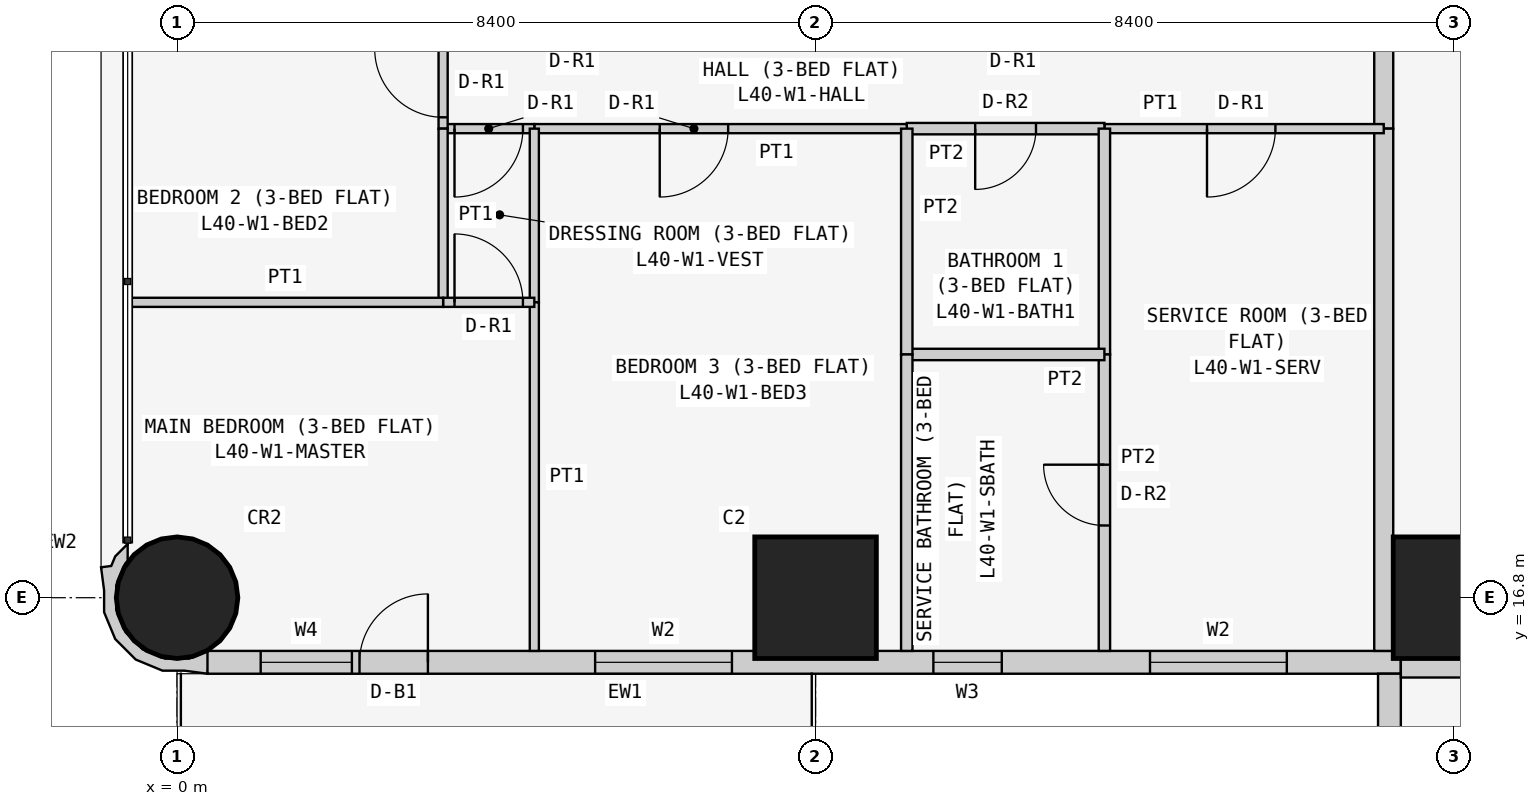
"""IFC4 building model, lengths in metres.
Left out: names, types, materials, properties, quantities, classifications, styles, units other than length and angle.
Written with IfcOpenShell. Run it as: python <this file> out.ifc"""

import sys

from ifc_helpers import new_model, si_unit, direction, frame, frame_2d, origin, origin_2d, place, context, subcontext, project, spatial, polyline, rectangle, circle, outline, extrude, element, fill, save


model = new_model("IFC4")
c1 = context("Model", 3, precision=1e-05, world=origin(), true_north=direction((0.0, 1.0)))
c2 = subcontext(c1, "Body", "Model", "MODEL_VIEW")
j1 = project(units=[si_unit("LENGTHUNIT", "METRE"), si_unit("PLANEANGLEUNIT", "RADIAN")], contexts=[c1])
p1 = place(None, origin())
s1 = spatial("IfcSite", under=j1, at=p1, CompositionType="ELEMENT")
p2 = place(p1, origin())
s2 = spatial("IfcBuilding", under=s1, at=p2, CompositionType="ELEMENT")
p3 = place(p2, frame((0.0, 0.0, 155.7)))
s3 = spatial("IfcBuildingStorey", under=s2, at=p3, CompositionType="ELEMENT", Elevation=155.7)
p4 = place(p3, frame((0.0, 16.8, 0.0), z_axis=(0.0, 0.0, 1.0), x_axis=(1.0, 0.0, 0.0)))
e1 = element("IfcColumn", 1, at=p4, inside=s3, PredefinedType="COLUMN", context=c2, shape_type="SweptSolid", body=[
    extrude(circle(Radius=0.8, at=origin_2d()), origin(), (0.0, 0.0, 1.0), 3.6),
])
for number, where, z_axis, x_axis in (
    (2, (8.4, 16.8, 0.0), (0.0, 0.0, 1.0), (1.0, 0.0, 0.0)),
    (3, (16.8, 16.8, 0.0), (0.0, 0.0, 1.0), (1.0, 0.0, 0.0)),
):
    element("IfcColumn", number, at=place(p3, frame(where, z_axis=z_axis, x_axis=x_axis)), inside=s3, PredefinedType="COLUMN", context=c2, shape_type="SweptSolid", body=[
        extrude(rectangle(XDim=1.6, YDim=1.6, at=origin_2d()), origin(), (0.0, 0.0, 1.0), 3.6),
    ])
p5 = place(p3, frame((0.4, 15.95, 0.0), z_axis=(0.0, 0.0, 1.0), x_axis=(1.0, 0.0, 0.0)))
e4 = element("IfcWall", 4, at=p5, inside=s3, PredefinedType="SOLIDWALL", context=c2, shape_type="SweptSolid", body=[
    extrude(rectangle(XDim=15.7, YDim=0.3, at=frame_2d((7.85, 0.0))), origin(), (0.0, 0.0, 1.0), 3.45),
])
p6 = place(p5, frame((12.4, 0.0, 0.9)))
e5 = element("IfcOpeningElement", 5, at=p6, cuts=e4, PredefinedType="OPENING", context=c2, shape_type="SweptSolid", body=[
    extrude(rectangle(XDim=1.8, YDim=1.5, at=frame_2d((0.9, 0.75))), frame((0.0, 0.16, 0.0), z_axis=(0.0, -1.0, 0.0), x_axis=(1.0, 0.0, 0.0)), (0.0, 0.0, 1.0), 0.32),
])
p7 = place(p5, frame((9.55, 0.0, 1.5)))
e6 = element("IfcOpeningElement", 6, at=p7, cuts=e4, PredefinedType="OPENING", context=c2, shape_type="SweptSolid", body=[
    extrude(rectangle(XDim=0.9, YDim=0.7, at=frame_2d((0.45, 0.35))), frame((0.0, 0.16, 0.0), z_axis=(0.0, -1.0, 0.0), x_axis=(1.0, 0.0, 0.0)), (0.0, 0.0, 1.0), 0.32),
])
p8 = place(p5, frame((5.1, 0.0, 0.9)))
e7 = element("IfcOpeningElement", 7, at=p8, cuts=e4, PredefinedType="OPENING", context=c2, shape_type="SweptSolid", body=[
    extrude(rectangle(XDim=1.8, YDim=1.5, at=frame_2d((0.9, 0.75))), frame((0.0, 0.16, 0.0), z_axis=(0.0, -1.0, 0.0), x_axis=(1.0, 0.0, 0.0)), (0.0, 0.0, 1.0), 0.32),
])
p9 = place(p5, frame((2.0, 0.0, 0.0)))
e8 = element("IfcOpeningElement", 8, at=p9, cuts=e4, PredefinedType="OPENING", context=c2, shape_type="SweptSolid", body=[
    extrude(rectangle(XDim=0.9, YDim=2.4, at=frame_2d((0.45, 1.2))), frame((0.0, 0.16, 0.0), z_axis=(0.0, -1.0, 0.0), x_axis=(1.0, 0.0, 0.0)), (0.0, 0.0, 1.0), 0.32),
])
p10 = place(p5, frame((0.7, 0.0, 0.9)))
e9 = element("IfcOpeningElement", 9, at=p10, cuts=e4, PredefinedType="OPENING", context=c2, shape_type="SweptSolid", body=[
    extrude(rectangle(XDim=1.2, YDim=1.5, at=frame_2d((0.6, 0.75))), frame((0.0, 0.16, 0.0), z_axis=(0.0, -1.0, 0.0), x_axis=(1.0, 0.0, 0.0)), (0.0, 0.0, 1.0), 0.32),
])
p11 = place(p3, frame((15.95, 15.8, 0.0), z_axis=(0.0, 0.0, 1.0), x_axis=(0.0, -1.0, 0.0)))
e10 = element("IfcWall", 10, at=p11, inside=s3, PredefinedType="SOLIDWALL", context=c2, shape_type="SweptSolid", body=[
    extrude(rectangle(XDim=7.0, YDim=0.3, at=frame_2d((3.5, 0.0))), origin(), (0.0, 0.0, 1.0), 3.45),
])
p12 = place(p11, frame((1.5, 0.0, 0.9)))
e11 = element("IfcOpeningElement", 11, at=p12, cuts=e10, PredefinedType="OPENING", context=c2, shape_type="SweptSolid", body=[
    extrude(rectangle(XDim=2.4, YDim=1.5, at=frame_2d((1.2, 0.75))), frame((0.0, 0.16, 0.0), z_axis=(0.0, -1.0, 0.0), x_axis=(1.0, 0.0, 0.0)), (0.0, 0.0, 1.0), 0.32),
])
p13 = place(p11, frame((5.05, 0.0, 0.9)))
e12 = element("IfcOpeningElement", 12, at=p13, cuts=e10, PredefinedType="OPENING", context=c2, shape_type="SweptSolid", body=[
    extrude(rectangle(XDim=1.2, YDim=1.5, at=frame_2d((0.6, 0.75))), frame((0.0, 0.16, 0.0), z_axis=(0.0, -1.0, 0.0), x_axis=(1.0, 0.0, 0.0)), (0.0, 0.0, 1.0), 0.32),
])
p14 = place(p3, frame((-0.595, 17.448, 0.0), z_axis=(0.0, 0.0, 1.0), x_axis=(-0.93923434088, -0.343276641956, 0.0)))
e13 = element("IfcWall", 13, at=p14, inside=s3, PredefinedType="SOLIDWALL", context=c2, shape_type="SweptSolid", body=[
    extrude(outline(polyline([(-0.369, 1.89), (-0.509, 1.621), (-0.491, 1.614), (-0.479, 1.609), (-0.211, 1.62), (0.088, 1.511), (0.323, 1.295), (0.457, 1.006), (0.47, 0.688), (0.361, 0.389), (0.146, 0.154), (0.108, 0.137), (0.031, -0.075), (0.241, 0.023), (0.334, 0.124), (0.465, 0.094), (0.532, 0.393), (0.631, 0.663), (0.614, 1.045), (0.453, 1.391), (0.172, 1.649), (-0.098, 1.748), (-0.369, 1.89)])), origin(), (0.0, 0.0, 1.0), 3.45),
])
p15 = place(p3, frame((22.571, 15.875, 0.0), z_axis=(0.0, 0.0, 1.0), x_axis=(-1.0, 0.0, 0.0)))
e14 = element("IfcWall", 14, at=p15, inside=s3, PredefinedType="PARTITIONING", context=c2, shape_type="SweptSolid", body=[
    extrude(rectangle(XDim=6.471, YDim=0.25, at=frame_2d((3.235, 0.0))), origin(), (0.0, 0.0, 1.0), 3.45),
])
p16 = place(p3, frame((15.875, 22.971, 0.0), z_axis=(0.0, 0.0, 1.0), x_axis=(0.0, 1.0, 0.0)))
e15 = element("IfcWall", 15, at=p16, inside=s3, PredefinedType="PARTITIONING", context=c2, shape_type="SweptSolid", body=[
    extrude(rectangle(XDim=1.2, YDim=0.25, at=frame_2d((0.6, 0.0))), origin(), (0.0, 0.0, 1.0), 3.45),
])
p17 = place(p3, frame((15.875, 16.1, 0.0), z_axis=(0.0, 0.0, 1.0), x_axis=(0.0, 1.0, 0.0)))
e16 = element("IfcWall", 16, at=p17, inside=s3, PredefinedType="PARTITIONING", context=c2, shape_type="SweptSolid", body=[
    extrude(rectangle(XDim=6.871, YDim=0.25, at=frame_2d((3.436, 0.0))), origin(), (0.0, 0.0, 1.0), 3.45),
])
p18 = place(p3, frame((12.2, 22.971, 0.0), z_axis=(0.0, 0.0, 1.0), x_axis=(1.0, 0.0, 0.0)))
e17 = element("IfcWall", 17, at=p18, inside=s3, PredefinedType="PARTITIONING", context=c2, shape_type="SweptSolid", body=[
    extrude(rectangle(XDim=3.675, YDim=0.12, at=frame_2d((1.837, 0.0))), origin(), (0.0, 0.0, 1.0), 3.45),
])
p19 = place(p18, frame((1.35, 0.0, 0.0)))
e18 = element("IfcOpeningElement", 18, at=p19, cuts=e17, PredefinedType="OPENING", context=c2, shape_type="SweptSolid", body=[
    extrude(rectangle(XDim=0.9, YDim=2.1, at=frame_2d((0.45, 1.05))), frame((0.0, 0.07, 0.0), z_axis=(0.0, -1.0, 0.0), x_axis=(1.0, 0.0, 0.0)), (0.0, 0.0, 1.0), 0.14),
])
p20 = place(p3, frame((9.6, 22.971, 0.0), z_axis=(0.0, 0.0, 1.0), x_axis=(1.0, 0.0, 0.0)))
e19 = element("IfcWall", 19, at=p20, inside=s3, PredefinedType="PARTITIONING", context=c2, shape_type="SweptSolid", body=[
    extrude(rectangle(XDim=2.6, YDim=0.15, at=frame_2d((1.3, 0.0))), origin(), (0.0, 0.0, 1.0), 3.45),
])
p21 = place(p20, frame((0.9, 0.0, 0.0)))
e20 = element("IfcOpeningElement", 20, at=p21, cuts=e19, PredefinedType="OPENING", context=c2, shape_type="SweptSolid", body=[
    extrude(rectangle(XDim=0.8, YDim=2.1, at=frame_2d((0.4, 1.05))), frame((0.0, 0.085, 0.0), z_axis=(0.0, -1.0, 0.0), x_axis=(1.0, 0.0, 0.0)), (0.0, 0.0, 1.0), 0.17),
])
p22 = place(p3, frame((4.7, 22.971, 0.0), z_axis=(0.0, 0.0, 1.0), x_axis=(1.0, 0.0, 0.0)))
e21 = element("IfcWall", 21, at=p22, inside=s3, PredefinedType="PARTITIONING", context=c2, shape_type="SweptSolid", body=[
    extrude(rectangle(XDim=4.9, YDim=0.12, at=frame_2d((2.45, 0.0))), origin(), (0.0, 0.0, 1.0), 3.45),
])
p23 = place(p22, frame((1.65, 0.0, 0.0)))
e22 = element("IfcOpeningElement", 22, at=p23, cuts=e21, PredefinedType="OPENING", context=c2, shape_type="SweptSolid", body=[
    extrude(rectangle(XDim=0.9, YDim=2.1, at=frame_2d((0.45, 1.05))), frame((0.0, 0.07, 0.0), z_axis=(0.0, -1.0, 0.0), x_axis=(1.0, 0.0, 0.0)), (0.0, 0.0, 1.0), 0.14),
])
p24 = place(p3, frame((3.5, 22.971, 0.0), z_axis=(0.0, 0.0, 1.0), x_axis=(1.0, 0.0, 0.0)))
e23 = element("IfcWall", 23, at=p24, inside=s3, PredefinedType="PARTITIONING", context=c2, shape_type="SweptSolid", body=[
    extrude(rectangle(XDim=1.2, YDim=0.12, at=frame_2d((0.6, 0.0))), origin(), (0.0, 0.0, 1.0), 3.45),
])
p25 = place(p24, frame((0.15, 0.0, 0.0)))
e24 = element("IfcOpeningElement", 24, at=p25, cuts=e23, PredefinedType="OPENING", context=c2, shape_type="SweptSolid", body=[
    extrude(rectangle(XDim=0.9, YDim=2.1, at=frame_2d((0.45, 1.05))), frame((0.0, 0.07, 0.0), z_axis=(0.0, -1.0, 0.0), x_axis=(1.0, 0.0, 0.0)), (0.0, 0.0, 1.0), 0.14),
])
p26 = place(p3, frame((3.5, 24.171, 0.0), z_axis=(0.0, 0.0, 1.0), x_axis=(0.0, -1.0, 0.0)))
e25 = element("IfcWall", 25, at=p26, inside=s3, PredefinedType="PARTITIONING", context=c2, shape_type="SweptSolid", body=[
    extrude(rectangle(XDim=1.2, YDim=0.12, at=frame_2d((0.6, 0.0))), origin(), (0.0, 0.0, 1.0), 3.45),
])
p27 = place(p26, frame((0.151, 0.0, 0.0)))
e26 = element("IfcOpeningElement", 26, at=p27, cuts=e25, PredefinedType="OPENING", context=c2, shape_type="SweptSolid", body=[
    extrude(rectangle(XDim=0.9, YDim=2.1, at=frame_2d((0.45, 1.05))), frame((0.0, 0.07, 0.0), z_axis=(0.0, -1.0, 0.0), x_axis=(1.0, 0.0, 0.0)), (0.0, 0.0, 1.0), 0.14),
])
p28 = place(p3, frame((12.2, 22.971, 0.0), z_axis=(0.0, 0.0, 1.0), x_axis=(0.0, -1.0, 0.0)))
e27 = element("IfcWall", 27, at=p28, inside=s3, PredefinedType="PARTITIONING", context=c2, shape_type="SweptSolid", body=[
    extrude(rectangle(XDim=2.971, YDim=0.15, at=frame_2d((1.485, 0.0))), origin(), (0.0, 0.0, 1.0), 3.45),
])
p29 = place(p3, frame((12.2, 20.0, 0.0), z_axis=(0.0, 0.0, 1.0), x_axis=(0.0, -1.0, 0.0)))
e28 = element("IfcWall", 28, at=p29, inside=s3, PredefinedType="PARTITIONING", context=c2, shape_type="SweptSolid", body=[
    extrude(rectangle(XDim=3.9, YDim=0.15, at=frame_2d((1.95, 0.0))), origin(), (0.0, 0.0, 1.0), 3.45),
])
p30 = place(p29, frame((1.45, 0.0, 0.0)))
e29 = element("IfcOpeningElement", 29, at=p30, cuts=e28, PredefinedType="OPENING", context=c2, shape_type="SweptSolid", body=[
    extrude(rectangle(XDim=0.8, YDim=2.1, at=frame_2d((0.4, 1.05))), frame((0.0, 0.085, 0.0), z_axis=(0.0, -1.0, 0.0), x_axis=(1.0, 0.0, 0.0)), (0.0, 0.0, 1.0), 0.17),
])
p31 = place(p3, frame((9.6, 20.0, 0.0), z_axis=(0.0, 0.0, 1.0), x_axis=(1.0, 0.0, 0.0)))
e30 = element("IfcWall", 30, at=p31, inside=s3, PredefinedType="PARTITIONING", context=c2, shape_type="SweptSolid", body=[
    extrude(rectangle(XDim=2.6, YDim=0.15, at=frame_2d((1.3, 0.0))), origin(), (0.0, 0.0, 1.0), 3.45),
])
p32 = place(p3, frame((9.6, 22.971, 0.0), z_axis=(0.0, 0.0, 1.0), x_axis=(0.0, -1.0, 0.0)))
e31 = element("IfcWall", 31, at=p32, inside=s3, PredefinedType="PARTITIONING", context=c2, shape_type="SweptSolid", body=[
    extrude(rectangle(XDim=2.971, YDim=0.15, at=frame_2d((1.485, 0.0))), origin(), (0.0, 0.0, 1.0), 3.45),
])
p33 = place(p3, frame((9.6, 20.0, 0.0), z_axis=(0.0, 0.0, 1.0), x_axis=(0.0, -1.0, 0.0)))
e32 = element("IfcWall", 32, at=p33, inside=s3, PredefinedType="PARTITIONING", context=c2, shape_type="SweptSolid", body=[
    extrude(rectangle(XDim=3.9, YDim=0.15, at=frame_2d((1.95, 0.0))), origin(), (0.0, 0.0, 1.0), 3.45),
])
p34 = place(p3, frame((4.7, 22.971, 0.0), z_axis=(0.0, 0.0, 1.0), x_axis=(0.0, -1.0, 0.0)))
e33 = element("IfcWall", 33, at=p34, inside=s3, PredefinedType="PARTITIONING", context=c2, shape_type="SweptSolid", body=[
    extrude(rectangle(XDim=2.285, YDim=0.12, at=frame_2d((1.143, 0.0))), origin(), (0.0, 0.0, 1.0), 3.45),
])
p35 = place(p3, frame((4.7, 20.686, 0.0), z_axis=(0.0, 0.0, 1.0), x_axis=(0.0, -1.0, 0.0)))
e34 = element("IfcWall", 34, at=p35, inside=s3, PredefinedType="PARTITIONING", context=c2, shape_type="SweptSolid", body=[
    extrude(rectangle(XDim=4.586, YDim=0.12, at=frame_2d((2.293, 0.0))), origin(), (0.0, 0.0, 1.0), 3.45),
])
p36 = place(p3, frame((3.5, 22.971, 0.0), z_axis=(0.0, 0.0, 1.0), x_axis=(0.0, -1.0, 0.0)))
e35 = element("IfcWall", 35, at=p36, inside=s3, PredefinedType="PARTITIONING", context=c2, shape_type="SweptSolid", body=[
    extrude(rectangle(XDim=2.285, YDim=0.12, at=frame_2d((1.143, 0.0))), origin(), (0.0, 0.0, 1.0), 3.45),
])
p37 = place(p3, frame((3.5, 20.686, 0.0), z_axis=(0.0, 0.0, 1.0), x_axis=(1.0, 0.0, 0.0)))
e36 = element("IfcWall", 36, at=p37, inside=s3, PredefinedType="PARTITIONING", context=c2, shape_type="SweptSolid", body=[
    extrude(rectangle(XDim=1.2, YDim=0.12, at=frame_2d((0.6, 0.0))), origin(), (0.0, 0.0, 1.0), 3.45),
])
p38 = place(p37, frame((0.15, 0.0, 0.0)))
e37 = element("IfcOpeningElement", 37, at=p38, cuts=e36, PredefinedType="OPENING", context=c2, shape_type="SweptSolid", body=[
    extrude(rectangle(XDim=0.9, YDim=2.1, at=frame_2d((0.45, 1.05))), frame((0.0, 0.07, 0.0), z_axis=(0.0, -1.0, 0.0), x_axis=(1.0, 0.0, 0.0)), (0.0, 0.0, 1.0), 0.14),
])
p39 = place(p3, frame((-0.65, 20.686, 0.0), z_axis=(0.0, 0.0, 1.0), x_axis=(1.0, 0.0, 0.0)))
e38 = element("IfcWall", 38, at=p39, inside=s3, PredefinedType="PARTITIONING", context=c2, shape_type="SweptSolid", body=[
    extrude(rectangle(XDim=4.15, YDim=0.12, at=frame_2d((2.075, 0.0))), origin(), (0.0, 0.0, 1.0), 3.45),
])
p40 = place(p6, origin())
e39 = element("IfcWindow", 39, at=p40, inside=s3, PartitioningType="SINGLE_PANEL", PredefinedType="WINDOW", context=c2, shape_type="SweptSolid", body=[
    extrude(rectangle(XDim=1.8, YDim=1.5, at=frame_2d((0.9, 0.75))), frame((0.0, 0.03, 0.0), z_axis=(0.0, -1.0, 0.0), x_axis=(1.0, 0.0, 0.0)), (0.0, 0.0, 1.0), 0.06),
])
fill(e5, e39)
p41 = place(p7, origin())
e40 = element("IfcWindow", 40, at=p41, inside=s3, PartitioningType="SINGLE_PANEL", PredefinedType="WINDOW", context=c2, shape_type="SweptSolid", body=[
    extrude(rectangle(XDim=0.9, YDim=0.7, at=frame_2d((0.45, 0.35))), frame((0.0, 0.03, 0.0), z_axis=(0.0, -1.0, 0.0), x_axis=(1.0, 0.0, 0.0)), (0.0, 0.0, 1.0), 0.06),
])
fill(e6, e40)
p42 = place(p8, origin())
e41 = element("IfcWindow", 41, at=p42, inside=s3, PartitioningType="SINGLE_PANEL", PredefinedType="WINDOW", context=c2, shape_type="SweptSolid", body=[
    extrude(rectangle(XDim=1.8, YDim=1.5, at=frame_2d((0.9, 0.75))), frame((0.0, 0.03, 0.0), z_axis=(0.0, -1.0, 0.0), x_axis=(1.0, 0.0, 0.0)), (0.0, 0.0, 1.0), 0.06),
])
fill(e7, e41)
p43 = place(p9, origin())
e42 = element("IfcDoor", 42, at=p43, inside=s3, OperationType="SINGLE_SWING_RIGHT", PredefinedType="DOOR", context=c2, shape_type="SweptSolid", body=[
    extrude(rectangle(XDim=0.9, YDim=2.4, at=frame_2d((0.45, 1.2))), frame((0.0, 0.025, 0.0), z_axis=(0.0, -1.0, 0.0), x_axis=(1.0, 0.0, 0.0)), (0.0, 0.0, 1.0), 0.05),
])
fill(e8, e42)
p44 = place(p10, origin())
e43 = element("IfcWindow", 43, at=p44, inside=s3, PartitioningType="SINGLE_PANEL", PredefinedType="WINDOW", context=c2, shape_type="SweptSolid", body=[
    extrude(rectangle(XDim=1.2, YDim=1.5, at=frame_2d((0.6, 0.75))), frame((0.0, 0.03, 0.0), z_axis=(0.0, -1.0, 0.0), x_axis=(1.0, 0.0, 0.0)), (0.0, 0.0, 1.0), 0.06),
])
fill(e9, e43)
p45 = place(p19, frame((0.9, 0.0, 0.0), z_axis=(0.0, 0.0, 1.0), x_axis=(-1.0, 0.0, 0.0)))
e44 = element("IfcDoor", 44, at=p45, inside=s3, OperationType="SINGLE_SWING_RIGHT", PredefinedType="DOOR", context=c2, shape_type="SweptSolid", body=[
    extrude(rectangle(XDim=0.9, YDim=2.1, at=frame_2d((0.45, 1.05))), frame((0.0, 0.025, 0.0), z_axis=(0.0, -1.0, 0.0), x_axis=(1.0, 0.0, 0.0)), (0.0, 0.0, 1.0), 0.05),
])
fill(e18, e44)
p46 = place(p30, frame((0.8, 0.0, 0.0), z_axis=(0.0, 0.0, 1.0), x_axis=(-1.0, 0.0, 0.0)))
e45 = element("IfcDoor", 45, at=p46, inside=s3, OperationType="SINGLE_SWING_RIGHT", PredefinedType="DOOR", context=c2, shape_type="SweptSolid", body=[
    extrude(rectangle(XDim=0.8, YDim=2.1, at=frame_2d((0.4, 1.05))), frame((0.0, 0.025, 0.0), z_axis=(0.0, -1.0, 0.0), x_axis=(1.0, 0.0, 0.0)), (0.0, 0.0, 1.0), 0.05),
])
fill(e29, e45)
p47 = place(p21, frame((0.8, 0.0, 0.0), z_axis=(0.0, 0.0, 1.0), x_axis=(-1.0, 0.0, 0.0)))
e46 = element("IfcDoor", 46, at=p47, inside=s3, OperationType="SINGLE_SWING_RIGHT", PredefinedType="DOOR", context=c2, shape_type="SweptSolid", body=[
    extrude(rectangle(XDim=0.8, YDim=2.1, at=frame_2d((0.4, 1.05))), frame((0.0, 0.025, 0.0), z_axis=(0.0, -1.0, 0.0), x_axis=(1.0, 0.0, 0.0)), (0.0, 0.0, 1.0), 0.05),
])
fill(e20, e46)
p48 = place(p23, frame((0.9, 0.0, 0.0), z_axis=(0.0, 0.0, 1.0), x_axis=(-1.0, 0.0, 0.0)))
e47 = element("IfcDoor", 47, at=p48, inside=s3, OperationType="SINGLE_SWING_RIGHT", PredefinedType="DOOR", context=c2, shape_type="SweptSolid", body=[
    extrude(rectangle(XDim=0.9, YDim=2.1, at=frame_2d((0.45, 1.05))), frame((0.0, 0.025, 0.0), z_axis=(0.0, -1.0, 0.0), x_axis=(1.0, 0.0, 0.0)), (0.0, 0.0, 1.0), 0.05),
])
fill(e22, e47)
p49 = place(p25, frame((0.9, 0.0, 0.0), z_axis=(0.0, 0.0, 1.0), x_axis=(-1.0, 0.0, 0.0)))
e48 = element("IfcDoor", 48, at=p49, inside=s3, OperationType="SINGLE_SWING_RIGHT", PredefinedType="DOOR", context=c2, shape_type="SweptSolid", body=[
    extrude(rectangle(XDim=0.9, YDim=2.1, at=frame_2d((0.45, 1.05))), frame((0.0, 0.025, 0.0), z_axis=(0.0, -1.0, 0.0), x_axis=(1.0, 0.0, 0.0)), (0.0, 0.0, 1.0), 0.05),
])
fill(e24, e48)
p50 = place(p38, origin())
e49 = element("IfcDoor", 49, at=p50, inside=s3, OperationType="SINGLE_SWING_LEFT", PredefinedType="DOOR", context=c2, shape_type="SweptSolid", body=[
    extrude(rectangle(XDim=0.9, YDim=2.1, at=frame_2d((0.45, 1.05))), frame((0.0, 0.025, 0.0), z_axis=(0.0, -1.0, 0.0), x_axis=(1.0, 0.0, 0.0)), (0.0, 0.0, 1.0), 0.05),
])
fill(e37, e49)
p51 = place(p27, frame((0.9, 0.0, 0.0), z_axis=(0.0, 0.0, 1.0), x_axis=(-1.0, 0.0, 0.0)))
e50 = element("IfcDoor", 50, at=p51, inside=s3, OperationType="SINGLE_SWING_RIGHT", PredefinedType="DOOR", context=c2, shape_type="SweptSolid", body=[
    extrude(rectangle(XDim=0.9, YDim=2.1, at=frame_2d((0.45, 1.05))), frame((0.0, 0.025, 0.0), z_axis=(0.0, -1.0, 0.0), x_axis=(1.0, 0.0, 0.0)), (0.0, 0.0, 1.0), 0.05),
])
fill(e26, e50)
save(model, sys.argv[1])
